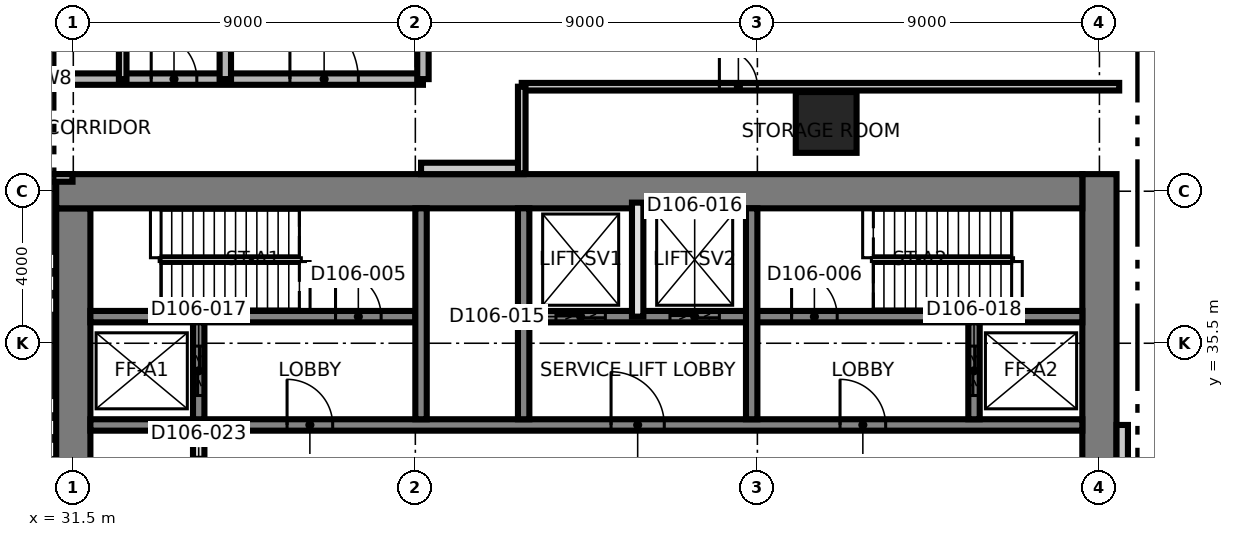
"""IFC4 building model, lengths in metres.
Left out: names, types, materials, properties, quantities, classifications, styles, units other than length and angle.
Written with IfcOpenShell. Run it as: python <this file> out.ifc"""

import sys

from ifc_helpers import new_model, si_unit, direction, frame, frame_2d, origin, origin_2d, place, context, subcontext, project, spatial, rectangle, extrude, element, fill, save


model = new_model("IFC4")
c1 = context("Model", 3, precision=1e-05, world=origin(), true_north=direction((0.0, 1.0)))
c2 = subcontext(c1, "Body", "Model", "MODEL_VIEW")
j1 = project(units=[si_unit("LENGTHUNIT", "METRE"), si_unit("PLANEANGLEUNIT", "RADIAN")], contexts=[c1])
p1 = place(None, origin())
s1 = spatial("IfcSite", under=j1, at=p1, CompositionType="ELEMENT")
p2 = place(p1, origin())
s2 = spatial("IfcBuilding", under=s1, at=p2, CompositionType="ELEMENT")
p3 = place(p2, frame((0.0, 0.0, 23.5)))
s3 = spatial("IfcBuildingStorey", under=s2, at=p3, CompositionType="ELEMENT", Elevation=23.5)
p4 = place(p3, frame((31.5, 21.95, 0.0), z_axis=(0.0, 0.0, 1.0), x_axis=(0.0, 1.0, 0.0)))
e1 = element("IfcWall", 1, at=p4, inside=s3, PredefinedType="SHEAR", context=c2, shape_type="SweptSolid", body=[
    extrude(rectangle(XDim=17.1, YDim=0.9, at=frame_2d((8.55, 0.0))), origin(), (0.0, 0.0, 1.0), 5.0),
])
p5 = place(p3, frame((58.5, 21.05, 0.0), z_axis=(0.0, 0.0, 1.0), x_axis=(0.0, 1.0, 0.0)))
e2 = element("IfcWall", 2, at=p5, inside=s3, PredefinedType="SHEAR", context=c2, shape_type="SweptSolid", body=[
    extrude(rectangle(XDim=18.9, YDim=0.9, at=frame_2d((9.45, 0.0))), origin(), (0.0, 0.0, 1.0), 5.0),
])
p6 = place(p3, frame((31.05, 39.5, 0.0), z_axis=(0.0, 0.0, 1.0), x_axis=(1.0, 0.0, 0.0)))
e3 = element("IfcWall", 3, at=p6, inside=s3, PredefinedType="SHEAR", context=c2, shape_type="SweptSolid", body=[
    extrude(rectangle(XDim=27.0, YDim=0.9, at=frame_2d((13.5, 0.0))), origin(), (0.0, 0.0, 1.0), 5.0),
])
p7 = place(p3, frame((31.95, 33.35, 0.0), z_axis=(0.0, 0.0, 1.0), x_axis=(1.0, 0.0, 0.0)))
e4 = element("IfcWall", 4, at=p7, inside=s3, PredefinedType="SHEAR", context=c2, shape_type="SweptSolid", body=[
    extrude(rectangle(XDim=26.1, YDim=0.3, at=frame_2d((13.05, 0.0))), origin(), (0.0, 0.0, 1.0), 5.0),
])
p8 = place(p7, frame((13.7, 0.0, 0.0)))
e5 = element("IfcOpeningElement", 5, at=p8, cuts=e4, PredefinedType="OPENING", context=c2, shape_type="SweptSolid", body=[
    extrude(rectangle(XDim=1.4, YDim=2.1, at=frame_2d((0.7, 1.05))), frame((0.0, 0.16, 0.0), z_axis=(0.0, -1.0, 0.0), x_axis=(1.0, 0.0, 0.0)), (0.0, 0.0, 1.0), 0.32),
])
p9 = place(p7, frame((5.175, 0.0, 0.0)))
e6 = element("IfcOpeningElement", 6, at=p9, cuts=e4, PredefinedType="OPENING", context=c2, shape_type="SweptSolid", body=[
    extrude(rectangle(XDim=1.2, YDim=2.1, at=frame_2d((0.6, 1.05))), frame((0.0, 0.16, 0.0), z_axis=(0.0, -1.0, 0.0), x_axis=(1.0, 0.0, 0.0)), (0.0, 0.0, 1.0), 0.32),
])
p10 = place(p7, frame((19.725, 0.0, 0.0)))
e7 = element("IfcOpeningElement", 7, at=p10, cuts=e4, PredefinedType="OPENING", context=c2, shape_type="SweptSolid", body=[
    extrude(rectangle(XDim=1.2, YDim=2.1, at=frame_2d((0.6, 1.05))), frame((0.0, 0.16, 0.0), z_axis=(0.0, -1.0, 0.0), x_axis=(1.0, 0.0, 0.0)), (0.0, 0.0, 1.0), 0.32),
])
p11 = place(p3, frame((31.95, 36.2, 0.0), z_axis=(0.0, 0.0, 1.0), x_axis=(1.0, 0.0, 0.0)))
e8 = element("IfcWall", 8, at=p11, inside=s3, PredefinedType="SHEAR", context=c2, shape_type="SweptSolid", body=[
    extrude(rectangle(XDim=8.55, YDim=0.3, at=frame_2d((4.275, 0.0))), origin(), (0.0, 0.0, 1.0), 5.0),
])
p12 = place(p11, frame((6.45, 0.0, 0.0)))
e9 = element("IfcOpeningElement", 9, at=p12, cuts=e8, PredefinedType="OPENING", context=c2, shape_type="SweptSolid", body=[
    extrude(rectangle(XDim=1.2, YDim=2.1, at=frame_2d((0.6, 1.05))), frame((0.0, 0.16, 0.0), z_axis=(0.0, -1.0, 0.0), x_axis=(1.0, 0.0, 0.0)), (0.0, 0.0, 1.0), 0.32),
])
p13 = place(p3, frame((43.5, 36.2, 0.0), z_axis=(0.0, 0.0, 1.0), x_axis=(1.0, 0.0, 0.0)))
e10 = element("IfcWall", 10, at=p13, inside=s3, PredefinedType="SHEAR", context=c2, shape_type="SweptSolid", body=[
    extrude(rectangle(XDim=14.55, YDim=0.3, at=frame_2d((7.275, 0.0))), origin(), (0.0, 0.0, 1.0), 5.0),
])
p14 = place(p13, frame((6.9, 0.0, 0.0)))
e11 = element("IfcOpeningElement", 11, at=p14, cuts=e10, PredefinedType="OPENING", context=c2, shape_type="SweptSolid", body=[
    extrude(rectangle(XDim=1.2, YDim=2.1, at=frame_2d((0.6, 1.05))), frame((0.0, 0.16, 0.0), z_axis=(0.0, -1.0, 0.0), x_axis=(1.0, 0.0, 0.0)), (0.0, 0.0, 1.0), 0.32),
])
p15 = place(p13, frame((0.7, 0.0, 0.0)))
e12 = element("IfcOpeningElement", 12, at=p15, cuts=e10, PredefinedType="OPENING", context=c2, shape_type="SweptSolid", body=[
    extrude(rectangle(XDim=1.3, YDim=2.4, at=frame_2d((0.65, 1.2))), frame((0.0, 0.16, 0.0), z_axis=(0.0, -1.0, 0.0), x_axis=(1.0, 0.0, 0.0)), (0.0, 0.0, 1.0), 0.32),
])
p16 = place(p13, frame((3.7, 0.0, 0.0)))
e13 = element("IfcOpeningElement", 13, at=p16, cuts=e10, PredefinedType="OPENING", context=c2, shape_type="SweptSolid", body=[
    extrude(rectangle(XDim=1.3, YDim=2.4, at=frame_2d((0.65, 1.2))), frame((0.0, 0.16, 0.0), z_axis=(0.0, -1.0, 0.0), x_axis=(1.0, 0.0, 0.0)), (0.0, 0.0, 1.0), 0.32),
])
for number, where, z_axis, x_axis in (
    (14, (40.65, 33.5, 0.0), (0.0, 0.0, 1.0), (0.0, 1.0, 0.0)),
    (15, (43.35, 33.5, 0.0), (0.0, 0.0, 1.0), (0.0, 1.0, 0.0)),
):
    element("IfcWall", number, at=place(p3, frame(where, z_axis=z_axis, x_axis=x_axis)), inside=s3, PredefinedType="SHEAR", context=c2, shape_type="SweptSolid", body=[
        extrude(rectangle(XDim=5.55, YDim=0.3, at=frame_2d((2.775, 0.0))), origin(), (0.0, 0.0, 1.0), 5.0),
    ])
p17 = place(p3, frame((34.8, 33.5, 0.0), z_axis=(0.0, 0.0, 1.0), x_axis=(0.0, 1.0, 0.0)))
e16 = element("IfcWall", 16, at=p17, inside=s3, PredefinedType="SHEAR", context=c2, shape_type="SweptSolid", body=[
    extrude(rectangle(XDim=2.55, YDim=0.3, at=frame_2d((1.275, 0.0))), origin(), (0.0, 0.0, 1.0), 5.0),
])
p18 = place(p17, frame((0.625, 0.0, 0.0)))
e17 = element("IfcOpeningElement", 17, at=p18, cuts=e16, PredefinedType="OPENING", context=c2, shape_type="SweptSolid", body=[
    extrude(rectangle(XDim=1.3, YDim=2.4, at=frame_2d((0.65, 1.2))), frame((0.0, 0.16, 0.0), z_axis=(0.0, -1.0, 0.0), x_axis=(1.0, 0.0, 0.0)), (0.0, 0.0, 1.0), 0.32),
])
p19 = place(p3, frame((49.35, 33.5, 0.0), z_axis=(0.0, 0.0, 1.0), x_axis=(0.0, 1.0, 0.0)))
e18 = element("IfcWall", 18, at=p19, inside=s3, PredefinedType="SHEAR", context=c2, shape_type="SweptSolid", body=[
    extrude(rectangle(XDim=5.55, YDim=0.3, at=frame_2d((2.775, 0.0))), origin(), (0.0, 0.0, 1.0), 5.0),
])
p20 = place(p3, frame((55.2, 33.5, 0.0), z_axis=(0.0, 0.0, 1.0), x_axis=(0.0, 1.0, 0.0)))
e19 = element("IfcWall", 19, at=p20, inside=s3, PredefinedType="SHEAR", context=c2, shape_type="SweptSolid", body=[
    extrude(rectangle(XDim=2.55, YDim=0.3, at=frame_2d((1.275, 0.0))), origin(), (0.0, 0.0, 1.0), 5.0),
])
p21 = place(p20, frame((0.625, 0.0, 0.0)))
e20 = element("IfcOpeningElement", 20, at=p21, cuts=e19, PredefinedType="OPENING", context=c2, shape_type="SweptSolid", body=[
    extrude(rectangle(XDim=1.3, YDim=2.4, at=frame_2d((0.65, 1.2))), frame((0.0, 0.16, 0.0), z_axis=(0.0, -1.0, 0.0), x_axis=(1.0, 0.0, 0.0)), (0.0, 0.0, 1.0), 0.32),
])
p22 = place(p3, frame((51.31, 41.31, 0.0), z_axis=(0.0, 0.0, 1.0), x_axis=(1.0, 0.0, 0.0)))
e21 = element("IfcColumn", 21, at=p22, inside=s3, PredefinedType="COLUMN", context=c2, shape_type="SweptSolid", body=[
    extrude(rectangle(XDim=1.6, YDim=1.6, at=origin_2d()), origin(), (0.0, 0.0, 1.0), 5.0),
])
p23 = place(p3, frame((40.65, 40.1, 0.0), z_axis=(0.0, 0.0, 1.0), x_axis=(1.0, 0.0, 0.0)))
e22 = element("IfcWall", 22, at=p23, inside=s3, PredefinedType="PARTITIONING", context=c2, shape_type="SweptSolid", body=[
    extrude(rectangle(XDim=2.7, YDim=0.3, at=frame_2d((1.35, 0.0))), origin(), (0.0, 0.0, 1.0), 4.7),
])
p24 = place(p3, frame((34.8, 27.9, 0.0), z_axis=(0.0, 0.0, 1.0), x_axis=(0.0, 1.0, 0.0)))
e23 = element("IfcWall", 23, at=p24, inside=s3, PredefinedType="SOLIDWALL", context=c2, shape_type="SweptSolid", body=[
    extrude(rectangle(XDim=5.45, YDim=0.3, at=frame_2d((2.725, 0.0))), origin(), (0.0, 0.0, 1.0), 4.7),
])
p25 = place(p24, frame((3.6, 0.0, 0.0)))
e24 = element("IfcOpeningElement", 24, at=p25, cuts=e23, PredefinedType="OPENING", context=c2, shape_type="SweptSolid", body=[
    extrude(rectangle(XDim=1.0, YDim=2.1, at=frame_2d((0.5, 1.05))), frame((0.0, 0.16, 0.0), z_axis=(0.0, -1.0, 0.0), x_axis=(1.0, 0.0, 0.0)), (0.0, 0.0, 1.0), 0.32),
])
p26 = place(p3, frame((46.35, 36.2, 0.0), z_axis=(0.0, 0.0, 1.0), x_axis=(0.0, 1.0, 0.0)))
e25 = element("IfcWall", 25, at=p26, inside=s3, PredefinedType="SOLIDWALL", context=c2, shape_type="SweptSolid", body=[
    extrude(rectangle(XDim=3.0, YDim=0.3, at=frame_2d((1.5, 0.0))), origin(), (0.0, 0.0, 1.0), 4.7),
])
p27 = place(p3, frame((59.1, 30.65, 0.0), z_axis=(0.0, 0.0, 1.0), x_axis=(0.0, 1.0, 0.0)))
e26 = element("IfcWall", 26, at=p27, inside=s3, PredefinedType="PARTITIONING", context=c2, shape_type="SweptSolid", body=[
    extrude(rectangle(XDim=2.7, YDim=0.3, at=frame_2d((1.35, 0.0))), origin(), (0.0, 0.0, 1.0), 4.7),
])
p28 = place(p3, frame((21.07, 39.85, 0.0), z_axis=(0.0, 0.0, 1.0), x_axis=(1.0, 0.0, 0.0)))
e27 = element("IfcWall", 27, at=p28, inside=s3, PredefinedType="PARTITIONING", context=c2, shape_type="SweptSolid", body=[
    extrude(rectangle(XDim=10.41, YDim=0.2, at=frame_2d((5.205, 0.0))), origin(), (0.0, 0.0, 1.0), 4.7),
])
p29 = place(p28, frame((4.257, 0.0, 0.0)))
e28 = element("IfcOpeningElement", 28, at=p29, cuts=e27, PredefinedType="OPENING", context=c2, shape_type="SweptSolid", body=[
    extrude(rectangle(XDim=1.6, YDim=2.1, at=frame_2d((0.8, 1.05))), frame((0.0, 0.11, 0.0), z_axis=(0.0, -1.0, 0.0), x_axis=(1.0, 0.0, 0.0)), (0.0, 0.0, 1.0), 0.22),
])
p30 = place(p3, frame((43.3, 42.25, 0.0), z_axis=(0.0, 0.0, 1.0), x_axis=(1.0, 0.0, 0.0)))
e29 = element("IfcWall", 29, at=p30, inside=s3, PredefinedType="PARTITIONING", context=c2, shape_type="SweptSolid", body=[
    extrude(rectangle(XDim=15.72, YDim=0.2, at=frame_2d((7.86, 0.0))), origin(), (0.0, 0.0, 1.0), 4.7),
])
p31 = place(p30, frame((5.2, 0.0, 0.0)))
e30 = element("IfcOpeningElement", 30, at=p31, cuts=e29, PredefinedType="OPENING", context=c2, shape_type="SweptSolid", body=[
    extrude(rectangle(XDim=1.0, YDim=2.1, at=frame_2d((0.5, 1.05))), frame((0.0, 0.11, 0.0), z_axis=(0.0, -1.0, 0.0), x_axis=(1.0, 0.0, 0.0)), (0.0, 0.0, 1.0), 0.22),
])
p32 = place(p3, frame((21.07, 42.45, 0.0), z_axis=(0.0, 0.0, 1.0), x_axis=(1.0, 0.0, 0.0)))
e31 = element("IfcWall", 31, at=p32, inside=s3, PredefinedType="SHEAR", context=c2, shape_type="SweptSolid", body=[
    extrude(rectangle(XDim=19.63, YDim=0.3, at=frame_2d((9.815, 0.0))), origin(), (0.0, 0.0, 1.0), 4.7),
])
p33 = place(p32, frame((16.13, 0.0, 0.0)))
e32 = element("IfcOpeningElement", 32, at=p33, cuts=e31, PredefinedType="OPENING", context=c2, shape_type="SweptSolid", body=[
    extrude(rectangle(XDim=1.8, YDim=2.1, at=frame_2d((0.9, 1.05))), frame((0.0, 0.16, 0.0), z_axis=(0.0, -1.0, 0.0), x_axis=(1.0, 0.0, 0.0)), (0.0, 0.0, 1.0), 0.32),
])
p34 = place(p32, frame((12.48, 0.0, 0.0)))
e33 = element("IfcOpeningElement", 33, at=p34, cuts=e31, PredefinedType="OPENING", context=c2, shape_type="SweptSolid", body=[
    extrude(rectangle(XDim=1.2, YDim=2.1, at=frame_2d((0.6, 1.05))), frame((0.0, 0.16, 0.0), z_axis=(0.0, -1.0, 0.0), x_axis=(1.0, 0.0, 0.0)), (0.0, 0.0, 1.0), 0.32),
])
p35 = place(p32, frame((5.33, 0.0, 0.0)))
e34 = element("IfcOpeningElement", 34, at=p35, cuts=e31, PredefinedType="OPENING", context=c2, shape_type="SweptSolid", body=[
    extrude(rectangle(XDim=1.0, YDim=2.1, at=frame_2d((0.5, 1.05))), frame((0.0, 0.16, 0.0), z_axis=(0.0, -1.0, 0.0), x_axis=(1.0, 0.0, 0.0)), (0.0, 0.0, 1.0), 0.32),
])
p36 = place(p3, frame((32.8, 42.45, 0.0), z_axis=(0.0, 0.0, 1.0), x_axis=(0.0, 1.0, 0.0)))
e35 = element("IfcWall", 35, at=p36, inside=s3, PredefinedType="PARTITIONING", context=c2, shape_type="SweptSolid", body=[
    extrude(rectangle(XDim=20.6, YDim=0.2, at=frame_2d((10.3, 0.0))), origin(), (0.0, 0.0, 1.0), 4.7),
])
p37 = place(p36, frame((7.5, 0.0, 0.0)))
e36 = element("IfcOpeningElement", 36, at=p37, cuts=e35, PredefinedType="OPENING", context=c2, shape_type="SweptSolid", body=[
    extrude(rectangle(XDim=1.0, YDim=2.1, at=frame_2d((0.5, 1.05))), frame((0.0, 0.11, 0.0), z_axis=(0.0, -1.0, 0.0), x_axis=(1.0, 0.0, 0.0)), (0.0, 0.0, 1.0), 0.22),
])
p38 = place(p36, frame((13.05, 0.0, 0.0)))
e37 = element("IfcOpeningElement", 37, at=p38, cuts=e35, PredefinedType="OPENING", context=c2, shape_type="SweptSolid", body=[
    extrude(rectangle(XDim=1.0, YDim=2.1, at=frame_2d((0.5, 1.05))), frame((0.0, 0.11, 0.0), z_axis=(0.0, -1.0, 0.0), x_axis=(1.0, 0.0, 0.0)), (0.0, 0.0, 1.0), 0.22),
])
p39 = place(p36, frame((17.8, 0.0, 0.0)))
e38 = element("IfcOpeningElement", 38, at=p39, cuts=e35, PredefinedType="OPENING", context=c2, shape_type="SweptSolid", body=[
    extrude(rectangle(XDim=1.0, YDim=2.1, at=frame_2d((0.5, 1.05))), frame((0.0, 0.11, 0.0), z_axis=(0.0, -1.0, 0.0), x_axis=(1.0, 0.0, 0.0)), (0.0, 0.0, 1.0), 0.22),
])
p40 = place(p3, frame((35.5, 42.45, 0.0), z_axis=(0.0, 0.0, 1.0), x_axis=(0.0, 1.0, 0.0)))
e39 = element("IfcWall", 39, at=p40, inside=s3, PredefinedType="SHEAR", context=c2, shape_type="SweptSolid", body=[
    extrude(rectangle(XDim=20.6, YDim=0.3, at=frame_2d((10.3, 0.0))), origin(), (0.0, 0.0, 1.0), 4.7),
])
p41 = place(p3, frame((40.7, 42.45, 0.0), z_axis=(0.0, 0.0, 1.0), x_axis=(0.0, 1.0, 0.0)))
e40 = element("IfcWall", 40, at=p41, inside=s3, PredefinedType="SHEAR", context=c2, shape_type="SweptSolid", body=[
    extrude(rectangle(XDim=20.7, YDim=0.3, at=frame_2d((10.35, 0.0))), origin(), (0.0, 0.0, 1.0), 4.7),
])
p42 = place(p41, frame((9.71, 0.0, 0.0)))
e41 = element("IfcOpeningElement", 41, at=p42, cuts=e40, PredefinedType="OPENING", context=c2, shape_type="SweptSolid", body=[
    extrude(rectangle(XDim=1.0, YDim=2.1, at=frame_2d((0.5, 1.05))), frame((0.0, 0.16, 0.0), z_axis=(0.0, -1.0, 0.0), x_axis=(1.0, 0.0, 0.0)), (0.0, 0.0, 1.0), 0.32),
])
p43 = place(p41, frame((12.673, 0.0, 0.0)))
e42 = element("IfcOpeningElement", 42, at=p43, cuts=e40, PredefinedType="OPENING", context=c2, shape_type="SweptSolid", body=[
    extrude(rectangle(XDim=1.0, YDim=2.1, at=frame_2d((0.5, 1.05))), frame((0.0, 0.16, 0.0), z_axis=(0.0, -1.0, 0.0), x_axis=(1.0, 0.0, 0.0)), (0.0, 0.0, 1.0), 0.32),
])
p44 = place(p41, frame((16.05, 0.0, 0.0)))
e43 = element("IfcOpeningElement", 43, at=p44, cuts=e40, PredefinedType="OPENING", context=c2, shape_type="SweptSolid", body=[
    extrude(rectangle(XDim=1.1, YDim=2.1, at=frame_2d((0.55, 1.05))), frame((0.0, 0.16, 0.0), z_axis=(0.0, -1.0, 0.0), x_axis=(1.0, 0.0, 0.0)), (0.0, 0.0, 1.0), 0.32),
])
p45 = place(p41, frame((18.694, 0.0, 0.0)))
e44 = element("IfcOpeningElement", 44, at=p45, cuts=e40, PredefinedType="OPENING", context=c2, shape_type="SweptSolid", body=[
    extrude(rectangle(XDim=1.0, YDim=2.1, at=frame_2d((0.5, 1.05))), frame((0.0, 0.16, 0.0), z_axis=(0.0, -1.0, 0.0), x_axis=(1.0, 0.0, 0.0)), (0.0, 0.0, 1.0), 0.32),
])
p46 = place(p3, frame((43.3, 39.97, 0.0), z_axis=(0.0, 0.0, 1.0), x_axis=(0.0, 1.0, 0.0)))
e45 = element("IfcWall", 45, at=p46, inside=s3, PredefinedType="PARTITIONING", context=c2, shape_type="SweptSolid", body=[
    extrude(rectangle(XDim=2.28, YDim=0.2, at=frame_2d((1.14, 0.0))), origin(), (0.0, 0.0, 1.0), 4.7),
])
p47 = place(p8, origin())
e46 = element("IfcDoor", 46, at=p47, inside=s3, OperationType="SINGLE_SWING_RIGHT", PredefinedType="DOOR", context=c2, shape_type="SweptSolid", body=[
    extrude(rectangle(XDim=1.4, YDim=2.1, at=frame_2d((0.7, 1.05))), frame((0.0, 0.025, 0.0), z_axis=(0.0, -1.0, 0.0), x_axis=(1.0, 0.0, 0.0)), (0.0, 0.0, 1.0), 0.05),
])
fill(e5, e46)
p48 = place(p9, origin())
e47 = element("IfcDoor", 47, at=p48, inside=s3, OperationType="SINGLE_SWING_LEFT", PredefinedType="DOOR", context=c2, shape_type="SweptSolid", body=[
    extrude(rectangle(XDim=1.2, YDim=2.1, at=frame_2d((0.6, 1.05))), frame((0.0, 0.025, 0.0), z_axis=(0.0, -1.0, 0.0), x_axis=(1.0, 0.0, 0.0)), (0.0, 0.0, 1.0), 0.05),
])
fill(e6, e47)
p49 = place(p10, origin())
e48 = element("IfcDoor", 48, at=p49, inside=s3, OperationType="SINGLE_SWING_RIGHT", PredefinedType="DOOR", context=c2, shape_type="SweptSolid", body=[
    extrude(rectangle(XDim=1.2, YDim=2.1, at=frame_2d((0.6, 1.05))), frame((0.0, 0.025, 0.0), z_axis=(0.0, -1.0, 0.0), x_axis=(1.0, 0.0, 0.0)), (0.0, 0.0, 1.0), 0.05),
])
fill(e7, e48)
p50 = place(p12, origin())
e49 = element("IfcDoor", 49, at=p50, inside=s3, OperationType="SINGLE_SWING_RIGHT", PredefinedType="DOOR", context=c2, shape_type="SweptSolid", body=[
    extrude(rectangle(XDim=1.2, YDim=2.1, at=frame_2d((0.6, 1.05))), frame((0.0, 0.025, 0.0), z_axis=(0.0, -1.0, 0.0), x_axis=(1.0, 0.0, 0.0)), (0.0, 0.0, 1.0), 0.05),
])
fill(e9, e49)
p51 = place(p14, origin())
e50 = element("IfcDoor", 50, at=p51, inside=s3, OperationType="SINGLE_SWING_LEFT", PredefinedType="DOOR", context=c2, shape_type="SweptSolid", body=[
    extrude(rectangle(XDim=1.2, YDim=2.1, at=frame_2d((0.6, 1.05))), frame((0.0, 0.025, 0.0), z_axis=(0.0, -1.0, 0.0), x_axis=(1.0, 0.0, 0.0)), (0.0, 0.0, 1.0), 0.05),
])
fill(e11, e50)
p52 = place(p15, origin())
e51 = element("IfcDoor", 51, at=p52, inside=s3, OperationType="SLIDING_TO_LEFT", PredefinedType="DOOR", context=c2, shape_type="SweptSolid", body=[
    extrude(rectangle(XDim=1.3, YDim=2.4, at=frame_2d((0.65, 1.2))), frame((0.0, 0.025, 0.0), z_axis=(0.0, -1.0, 0.0), x_axis=(1.0, 0.0, 0.0)), (0.0, 0.0, 1.0), 0.05),
])
fill(e12, e51)
p53 = place(p16, origin())
e52 = element("IfcDoor", 52, at=p53, inside=s3, OperationType="SLIDING_TO_LEFT", PredefinedType="DOOR", context=c2, shape_type="SweptSolid", body=[
    extrude(rectangle(XDim=1.3, YDim=2.4, at=frame_2d((0.65, 1.2))), frame((0.0, 0.025, 0.0), z_axis=(0.0, -1.0, 0.0), x_axis=(1.0, 0.0, 0.0)), (0.0, 0.0, 1.0), 0.05),
])
fill(e13, e52)
p54 = place(p18, origin())
e53 = element("IfcDoor", 53, at=p54, inside=s3, OperationType="SLIDING_TO_LEFT", PredefinedType="DOOR", context=c2, shape_type="SweptSolid", body=[
    extrude(rectangle(XDim=1.3, YDim=2.4, at=frame_2d((0.65, 1.2))), frame((0.0, 0.025, 0.0), z_axis=(0.0, -1.0, 0.0), x_axis=(1.0, 0.0, 0.0)), (0.0, 0.0, 1.0), 0.05),
])
fill(e17, e53)
p55 = place(p21, origin())
e54 = element("IfcDoor", 54, at=p55, inside=s3, OperationType="SLIDING_TO_LEFT", PredefinedType="DOOR", context=c2, shape_type="SweptSolid", body=[
    extrude(rectangle(XDim=1.3, YDim=2.4, at=frame_2d((0.65, 1.2))), frame((0.0, 0.025, 0.0), z_axis=(0.0, -1.0, 0.0), x_axis=(1.0, 0.0, 0.0)), (0.0, 0.0, 1.0), 0.05),
])
fill(e20, e54)
p56 = place(p33, origin())
e55 = element("IfcDoor", 55, at=p56, inside=s3, OperationType="SINGLE_SWING_RIGHT", PredefinedType="DOOR", context=c2, shape_type="SweptSolid", body=[
    extrude(rectangle(XDim=1.8, YDim=2.1, at=frame_2d((0.9, 1.05))), frame((0.0, 0.025, 0.0), z_axis=(0.0, -1.0, 0.0), x_axis=(1.0, 0.0, 0.0)), (0.0, 0.0, 1.0), 0.05),
])
fill(e32, e55)
p57 = place(p34, origin())
e56 = element("IfcDoor", 56, at=p57, inside=s3, OperationType="SINGLE_SWING_LEFT", PredefinedType="DOOR", context=c2, shape_type="SweptSolid", body=[
    extrude(rectangle(XDim=1.2, YDim=2.1, at=frame_2d((0.6, 1.05))), frame((0.0, 0.025, 0.0), z_axis=(0.0, -1.0, 0.0), x_axis=(1.0, 0.0, 0.0)), (0.0, 0.0, 1.0), 0.05),
])
fill(e33, e56)
p58 = place(p31, origin())
e57 = element("IfcDoor", 57, at=p58, inside=s3, OperationType="SINGLE_SWING_RIGHT", PredefinedType="DOOR", context=c2, shape_type="SweptSolid", body=[
    extrude(rectangle(XDim=1.0, YDim=2.1, at=frame_2d((0.5, 1.05))), frame((0.0, 0.025, 0.0), z_axis=(0.0, -1.0, 0.0), x_axis=(1.0, 0.0, 0.0)), (0.0, 0.0, 1.0), 0.05),
])
fill(e30, e57)
save(model, sys.argv[1])
